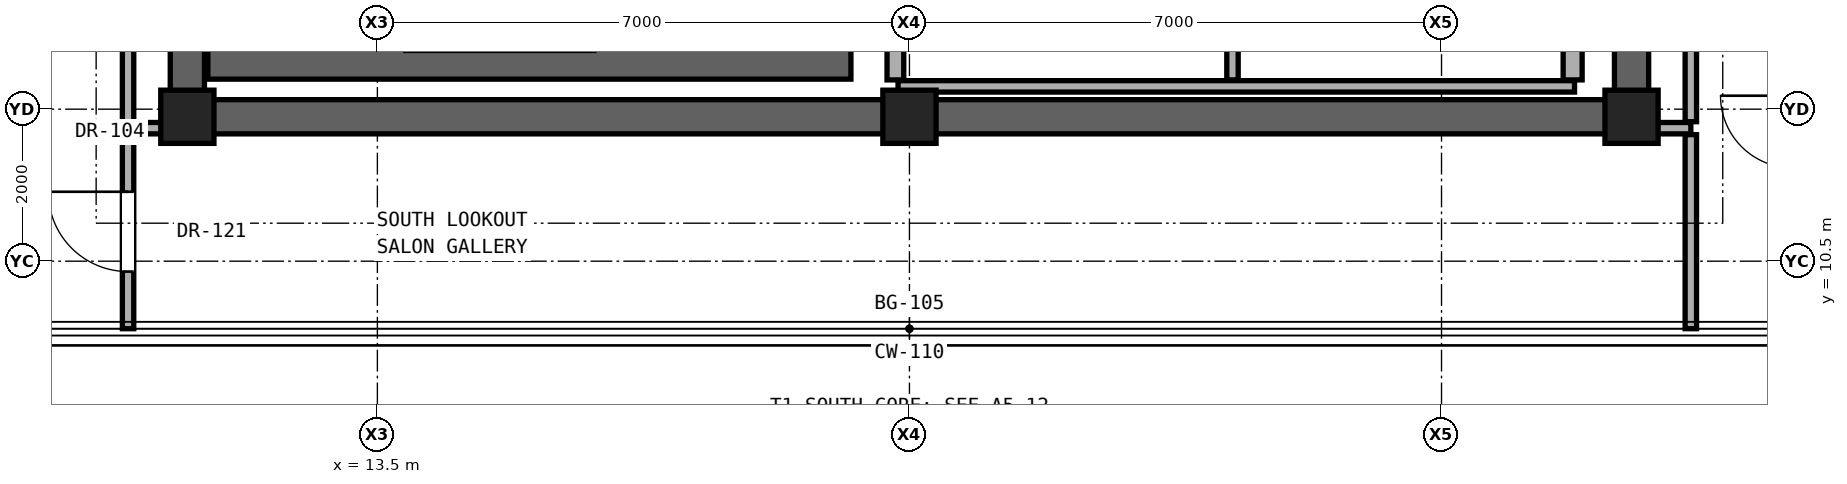
"""IFC4 building model, lengths in metres.
Left out: names, types, materials, properties, quantities, classifications, styles, units other than length and angle.
Written with IfcOpenShell. Run it as: python <this file> out.ifc"""

import sys

from ifc_helpers import new_model, si_unit, direction, frame, frame_2d, origin, origin_2d, place, context, subcontext, project, spatial, rectangle, extrude, element, fill, save


model = new_model("IFC4")
c1 = context("Model", 3, precision=1e-05, world=origin(), true_north=direction((0.0, 1.0)))
c2 = subcontext(c1, "Body", "Model", "MODEL_VIEW")
j1 = project(units=[si_unit("LENGTHUNIT", "METRE"), si_unit("PLANEANGLEUNIT", "RADIAN")], contexts=[c1])
p1 = place(None, origin())
s1 = spatial("IfcSite", under=j1, at=p1, CompositionType="ELEMENT")
p2 = place(p1, origin())
s2 = spatial("IfcBuilding", under=s1, at=p2, CompositionType="ELEMENT")
p3 = place(p2, frame((0.0, 0.0, 252.7)))
s3 = spatial("IfcBuildingStorey", under=s2, at=p3, CompositionType="ELEMENT", Elevation=252.7)
for number, where, z_axis, x_axis in (
    (1, (11.0, 12.4, 0.0), (0.0, 0.0, 1.0), (1.0, 0.0, 0.0)),
    (2, (20.5, 12.4, 0.0), (0.0, 0.0, 1.0), (1.0, 0.0, 0.0)),
    (3, (30.0, 12.4, 0.0), (0.0, 0.0, 1.0), (1.0, 0.0, 0.0)),
):
    element("IfcColumn", number, at=place(p3, frame(where, z_axis=z_axis, x_axis=x_axis)), inside=s3, PredefinedType="COLUMN", context=c2, shape_type="SweptSolid", body=[
        extrude(rectangle(XDim=0.7, YDim=0.7, at=origin_2d()), origin(), (0.0, 0.0, 1.0), 3.6),
    ])
p4 = place(p3, frame((11.0, 12.4, 0.0), z_axis=(0.0, 0.0, 1.0), x_axis=(1.0, 0.0, 0.0)))
e4 = element("IfcWall", 4, at=p4, inside=s3, PredefinedType="SHEAR", context=c2, shape_type="SweptSolid", body=[
    extrude(rectangle(XDim=19.0, YDim=0.45, at=frame_2d((9.5, 0.0))), origin(), (0.0, 0.0, 1.0), 3.4),
])
for number, where, z_axis, x_axis in (
    (5, (11.0, 12.4, 0.0), (0.0, 0.0, 1.0), (0.0, 1.0, 0.0)),
    (6, (30.0, 12.4, 0.0), (0.0, 0.0, 1.0), (0.0, 1.0, 0.0)),
):
    element("IfcWall", number, at=place(p3, frame(where, z_axis=z_axis, x_axis=x_axis)), inside=s3, PredefinedType="SHEAR", context=c2, shape_type="SweptSolid", body=[
        extrude(rectangle(XDim=6.0, YDim=0.45, at=frame_2d((3.0, 0.0))), origin(), (0.0, 0.0, 1.0), 3.4),
    ])
for number, where, z_axis, x_axis in (
    (7, (10.22, 12.25, 0.0), (0.0, 0.0, 1.0), (1.0, 0.0, 0.0)),
    (8, (30.22, 12.25, 0.0), (0.0, 0.0, 1.0), (1.0, 0.0, 0.0)),
):
    element("IfcWall", number, at=place(p3, frame(where, z_axis=z_axis, x_axis=x_axis)), inside=s3, PredefinedType="PARTITIONING", context=c2, shape_type="SweptSolid", body=[
        extrude(rectangle(XDim=0.56, YDim=0.15, at=frame_2d((0.28, 0.0))), origin(), (0.0, 0.0, 1.0), 3.4),
    ])
p5 = place(p3, frame((20.35, 12.8, 0.0), z_axis=(0.0, 0.0, 1.0), x_axis=(1.0, 0.0, 0.0)))
e9 = element("IfcWall", 9, at=p5, inside=s3, PredefinedType="PARTITIONING", context=c2, shape_type="SweptSolid", body=[
    extrude(rectangle(XDim=8.9, YDim=0.15, at=frame_2d((4.45, 0.0))), origin(), (0.0, 0.0, 1.0), 3.4),
])
p6 = place(p3, frame((11.27, 13.12, 0.0), z_axis=(0.0, 0.0, 1.0), x_axis=(1.0, 0.0, 0.0)))
e10 = element("IfcWall", 10, at=p6, inside=s3, PredefinedType="SHEAR", context=c2, shape_type="SweptSolid", body=[
    extrude(rectangle(XDim=8.46, YDim=0.45, at=frame_2d((4.23, 0.0))), origin(), (0.0, 0.0, 1.0), 3.4),
])
p7 = place(p3, frame((10.22, 9.612, 0.0), z_axis=(0.0, 0.0, 1.0), x_axis=(0.0, 1.0, 0.0)))
e11 = element("IfcWall", 11, at=p7, inside=s3, PredefinedType="PARTITIONING", context=c2, shape_type="SweptSolid", body=[
    extrude(rectangle(XDim=2.553, YDim=0.15, at=frame_2d((1.276, 0.0))), origin(), (0.0, 0.0, 1.0), 3.4),
])
p8 = place(p7, frame((0.751, 0.0, 0.0)))
e12 = element("IfcOpeningElement", 12, at=p8, cuts=e11, PredefinedType="OPENING", context=c2, shape_type="SweptSolid", body=[
    extrude(rectangle(XDim=1.05, YDim=2.2, at=frame_2d((0.525, 1.1))), frame((0.0, 0.085, 0.0), z_axis=(0.0, -1.0, 0.0), x_axis=(1.0, 0.0, 0.0)), (0.0, 0.0, 1.0), 0.17),
])
p9 = place(p3, frame((10.22, 12.335, 0.0), z_axis=(0.0, 0.0, 1.0), x_axis=(0.0, 1.0, 0.0)))
e13 = element("IfcWall", 13, at=p9, inside=s3, PredefinedType="PARTITIONING", context=c2, shape_type="SweptSolid", body=[
    extrude(rectangle(XDim=5.98, YDim=0.15, at=frame_2d((2.99, 0.0))), origin(), (0.0, 0.0, 1.0), 2.792),
])
p10 = place(p3, frame((20.315, 12.885, 0.0), z_axis=(0.0, 0.0, 1.0), x_axis=(0.0, 1.0, 0.0)))
e14 = element("IfcWall", 14, at=p10, inside=s3, PredefinedType="SOLIDWALL", context=c2, shape_type="SweptSolid", body=[
    extrude(rectangle(XDim=3.2, YDim=0.22, at=frame_2d((1.6, 0.0))), origin(), (0.0, 0.0, 1.0), 3.4),
])
p11 = place(p3, frame((24.75, 12.885, 0.0), z_axis=(0.0, 0.0, 1.0), x_axis=(0.0, 1.0, 0.0)))
e15 = element("IfcWall", 15, at=p11, inside=s3, PredefinedType="PARTITIONING", context=c2, shape_type="SweptSolid", body=[
    extrude(rectangle(XDim=2.542, YDim=0.15, at=frame_2d((1.271, 0.0))), origin(), (0.0, 0.0, 1.0), 3.4),
])
p12 = place(p11, frame((0.796, 0.0, 0.0)))
e16 = element("IfcOpeningElement", 16, at=p12, cuts=e15, PredefinedType="OPENING", context=c2, shape_type="SweptSolid", body=[
    extrude(rectangle(XDim=0.95, YDim=2.15, at=frame_2d((0.475, 1.075))), frame((0.0, 0.085, 0.0), z_axis=(0.0, -1.0, 0.0), x_axis=(1.0, 0.0, 0.0)), (0.0, 0.0, 1.0), 0.17),
])
p13 = place(p3, frame((29.225, 12.885, 0.0), z_axis=(0.0, 0.0, 1.0), x_axis=(0.0, 1.0, 0.0)))
e17 = element("IfcWall", 17, at=p13, inside=s3, PredefinedType="SOLIDWALL", context=c2, shape_type="SweptSolid", body=[
    extrude(rectangle(XDim=2.542, YDim=0.25, at=frame_2d((1.271, 0.0))), origin(), (0.0, 0.0, 1.0), 3.4),
])
p14 = place(p3, frame((30.78, 9.612, 0.0), z_axis=(0.0, 0.0, 1.0), x_axis=(0.0, 1.0, 0.0)))
e18 = element("IfcWall", 18, at=p14, inside=s3, PredefinedType="PARTITIONING", context=c2, shape_type="SweptSolid", body=[
    extrude(rectangle(XDim=2.553, YDim=0.15, at=frame_2d((1.276, 0.0))), origin(), (0.0, 0.0, 1.0), 3.4),
])
p15 = place(p3, frame((30.78, 12.335, 0.0), z_axis=(0.0, 0.0, 1.0), x_axis=(0.0, 1.0, 0.0)))
e19 = element("IfcWall", 19, at=p15, inside=s3, PredefinedType="PARTITIONING", context=c2, shape_type="SweptSolid", body=[
    extrude(rectangle(XDim=5.98, YDim=0.15, at=frame_2d((2.99, 0.0))), origin(), (0.0, 0.0, 1.0), 2.792),
])
p16 = place(p8, origin())
e20 = element("IfcDoor", 20, at=p16, inside=s3, OperationType="SINGLE_SWING_RIGHT", PredefinedType="DOOR", context=c2, shape_type="SweptSolid", body=[
    extrude(rectangle(XDim=1.05, YDim=2.2, at=frame_2d((0.525, 1.1))), frame((0.0, 0.025, 0.0), z_axis=(0.0, -1.0, 0.0), x_axis=(1.0, 0.0, 0.0)), (0.0, 0.0, 1.0), 0.05),
])
fill(e12, e20)
save(model, sys.argv[1])
